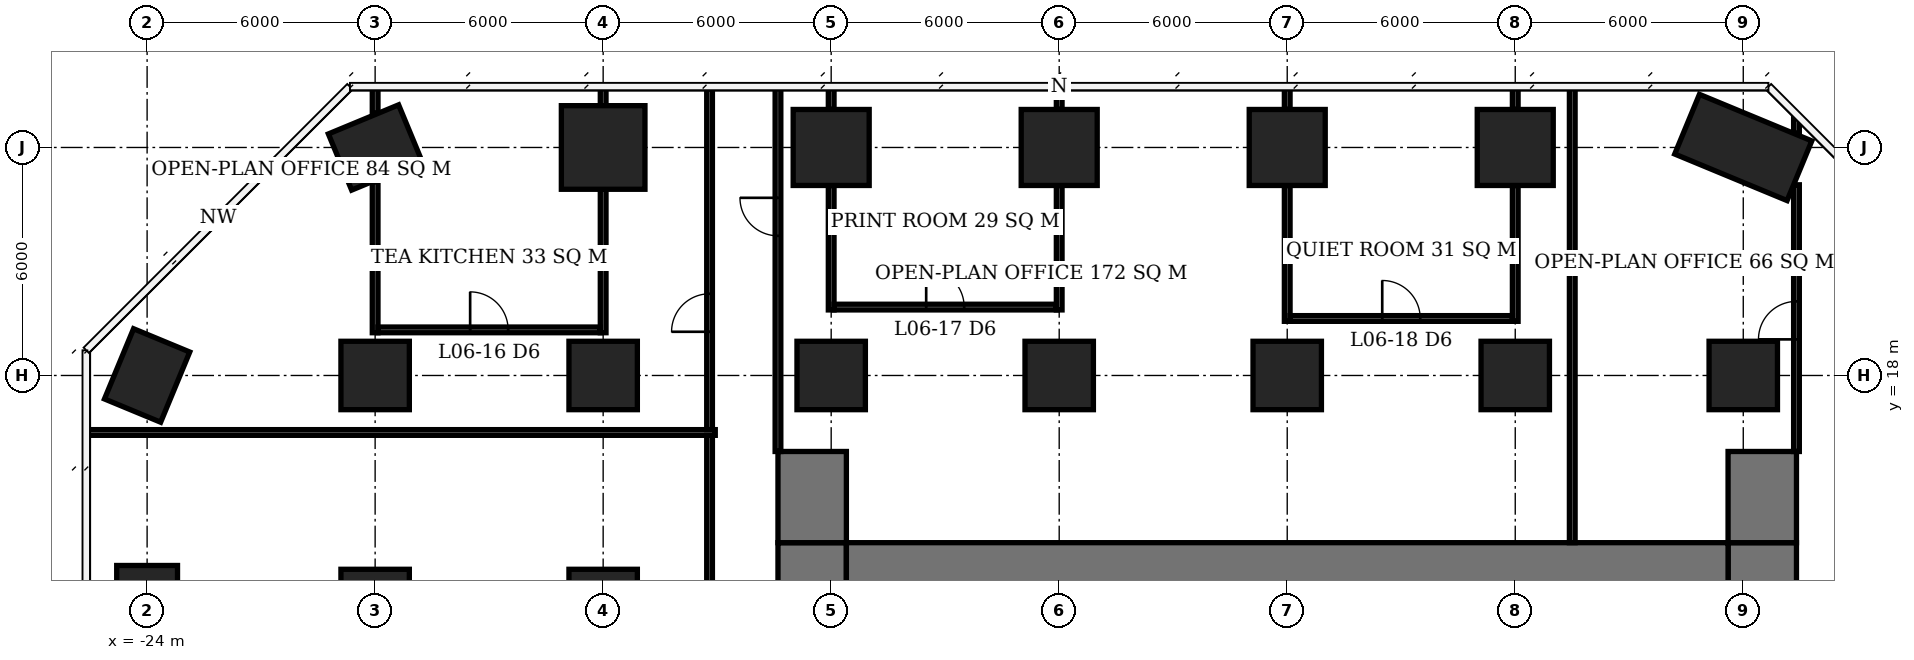
"""IFC4 building model, lengths in metres.
Left out: names, types, materials, properties, quantities, classifications, styles, units other than length and angle.
Written with IfcOpenShell. Run it as: python <this file> out.ifc"""

import sys

from ifc_helpers import new_model, si_unit, direction, frame, frame_2d, origin, origin_2d, place, context, subcontext, project, spatial, rectangle, extrude, element, fill, save


model = new_model("IFC4")
c1 = context("Model", 3, precision=1e-05, world=origin(), true_north=direction((0.0, 1.0)))
c2 = subcontext(c1, "Body", "Model", "MODEL_VIEW")
j1 = project(units=[si_unit("LENGTHUNIT", "METRE"), si_unit("PLANEANGLEUNIT", "RADIAN")], contexts=[c1])
p1 = place(None, origin())
s1 = spatial("IfcSite", under=j1, at=p1, CompositionType="ELEMENT")
p2 = place(p1, origin())
s2 = spatial("IfcBuilding", under=s1, at=p2, CompositionType="ELEMENT")
p3 = place(p2, frame((0.0, 0.0, 29.9)))
s3 = spatial("IfcBuildingStorey", under=s2, at=p3, CompositionType="ELEMENT", Elevation=29.9)
for number, where, z_axis, x_axis in (
    (1, (-24.0, 12.0, 0.0), (0.0, 0.0, 1.0), (0.0, 1.0, 0.0)),
    (2, (-24.0, 18.0, 0.0), (0.0, 0.0, 1.0), (0.383, 0.924, 0.0)),
):
    element("IfcColumn", number, at=place(p3, frame(where, z_axis=z_axis, x_axis=x_axis)), inside=s3, PredefinedType="COLUMN", context=c2, shape_type="SweptSolid", body=[
        extrude(rectangle(XDim=2.0, YDim=1.6, at=origin_2d()), origin(), (0.0, 0.0, 1.0), 3.9),
    ])
for number, where, z_axis, x_axis in (
    (3, (-18.0, 12.0, 0.0), (0.0, 0.0, 1.0), (1.0, 0.0, 0.0)),
    (4, (-18.0, 18.0, 0.0), (0.0, 0.0, 1.0), (1.0, 0.0, 0.0)),
):
    element("IfcColumn", number, at=place(p3, frame(where, z_axis=z_axis, x_axis=x_axis)), inside=s3, PredefinedType="COLUMN", context=c2, shape_type="SweptSolid", body=[
        extrude(rectangle(XDim=1.8, YDim=1.8, at=origin_2d()), origin(), (0.0, 0.0, 1.0), 3.9),
    ])
p4 = place(p3, frame((-18.0, 24.0, 0.0), z_axis=(0.0, 0.0, 1.0), x_axis=(0.923879532511, 0.382683432365, 0.0)))
e5 = element("IfcColumn", 5, at=p4, inside=s3, PredefinedType="COLUMN", context=c2, shape_type="SweptSolid", body=[
    extrude(rectangle(XDim=2.0, YDim=1.6, at=origin_2d()), origin(), (0.0, 0.0, 1.0), 3.9),
])
for number, where, z_axis, x_axis in (
    (6, (-12.0, 12.0, 0.0), (0.0, 0.0, 1.0), (1.0, 0.0, 0.0)),
    (7, (-12.0, 18.0, 0.0), (0.0, 0.0, 1.0), (1.0, 0.0, 0.0)),
):
    element("IfcColumn", number, at=place(p3, frame(where, z_axis=z_axis, x_axis=x_axis)), inside=s3, PredefinedType="COLUMN", context=c2, shape_type="SweptSolid", body=[
        extrude(rectangle(XDim=1.8, YDim=1.8, at=origin_2d()), origin(), (0.0, 0.0, 1.0), 3.9),
    ])
p5 = place(p3, frame((-12.0, 24.0, 0.0), z_axis=(0.0, 0.0, 1.0), x_axis=(1.0, 0.0, 0.0)))
e8 = element("IfcColumn", 8, at=p5, inside=s3, PredefinedType="COLUMN", context=c2, shape_type="SweptSolid", body=[
    extrude(rectangle(XDim=2.2, YDim=2.2, at=origin_2d()), origin(), (0.0, 0.0, 1.0), 3.9),
])
p6 = place(p3, frame((-6.0, 18.0, 0.0), z_axis=(0.0, 0.0, 1.0), x_axis=(1.0, 0.0, 0.0)))
e9 = element("IfcColumn", 9, at=p6, inside=s3, PredefinedType="COLUMN", context=c2, shape_type="SweptSolid", body=[
    extrude(rectangle(XDim=1.8, YDim=1.8, at=origin_2d()), origin(), (0.0, 0.0, 1.0), 3.9),
])
p7 = place(p3, frame((-6.0, 24.0, 0.0), z_axis=(0.0, 0.0, 1.0), x_axis=(1.0, 0.0, 0.0)))
e10 = element("IfcColumn", 10, at=p7, inside=s3, PredefinedType="COLUMN", context=c2, shape_type="SweptSolid", body=[
    extrude(rectangle(XDim=2.0, YDim=2.0, at=origin_2d()), origin(), (0.0, 0.0, 1.0), 3.9),
])
p8 = place(p3, frame((0.0, 18.0, 0.0), z_axis=(0.0, 0.0, 1.0), x_axis=(1.0, 0.0, 0.0)))
e11 = element("IfcColumn", 11, at=p8, inside=s3, PredefinedType="COLUMN", context=c2, shape_type="SweptSolid", body=[
    extrude(rectangle(XDim=1.8, YDim=1.8, at=origin_2d()), origin(), (0.0, 0.0, 1.0), 3.9),
])
p9 = place(p3, frame((0.0, 24.0, 0.0), z_axis=(0.0, 0.0, 1.0), x_axis=(1.0, 0.0, 0.0)))
e12 = element("IfcColumn", 12, at=p9, inside=s3, PredefinedType="COLUMN", context=c2, shape_type="SweptSolid", body=[
    extrude(rectangle(XDim=2.0, YDim=2.0, at=origin_2d()), origin(), (0.0, 0.0, 1.0), 3.9),
])
p10 = place(p3, frame((6.0, 18.0, 0.0), z_axis=(0.0, 0.0, 1.0), x_axis=(1.0, 0.0, 0.0)))
e13 = element("IfcColumn", 13, at=p10, inside=s3, PredefinedType="COLUMN", context=c2, shape_type="SweptSolid", body=[
    extrude(rectangle(XDim=1.8, YDim=1.8, at=origin_2d()), origin(), (0.0, 0.0, 1.0), 3.9),
])
p11 = place(p3, frame((6.0, 24.0, 0.0), z_axis=(0.0, 0.0, 1.0), x_axis=(1.0, 0.0, 0.0)))
e14 = element("IfcColumn", 14, at=p11, inside=s3, PredefinedType="COLUMN", context=c2, shape_type="SweptSolid", body=[
    extrude(rectangle(XDim=2.0, YDim=2.0, at=origin_2d()), origin(), (0.0, 0.0, 1.0), 3.9),
])
p12 = place(p3, frame((12.0, 18.0, 0.0), z_axis=(0.0, 0.0, 1.0), x_axis=(1.0, 0.0, 0.0)))
e15 = element("IfcColumn", 15, at=p12, inside=s3, PredefinedType="COLUMN", context=c2, shape_type="SweptSolid", body=[
    extrude(rectangle(XDim=1.8, YDim=1.8, at=origin_2d()), origin(), (0.0, 0.0, 1.0), 3.9),
])
p13 = place(p3, frame((12.0, 24.0, 0.0), z_axis=(0.0, 0.0, 1.0), x_axis=(1.0, 0.0, 0.0)))
e16 = element("IfcColumn", 16, at=p13, inside=s3, PredefinedType="COLUMN", context=c2, shape_type="SweptSolid", body=[
    extrude(rectangle(XDim=2.0, YDim=2.0, at=origin_2d()), origin(), (0.0, 0.0, 1.0), 3.9),
])
p14 = place(p3, frame((18.0, 18.0, 0.0), z_axis=(0.0, 0.0, 1.0), x_axis=(1.0, 0.0, 0.0)))
e17 = element("IfcColumn", 17, at=p14, inside=s3, PredefinedType="COLUMN", context=c2, shape_type="SweptSolid", body=[
    extrude(rectangle(XDim=1.8, YDim=1.8, at=origin_2d()), origin(), (0.0, 0.0, 1.0), 3.9),
])
p15 = place(p3, frame((18.0, 24.0, 0.0), z_axis=(0.0, 0.0, 1.0), x_axis=(0.923879532511, -0.382683432365, 0.0)))
e18 = element("IfcColumn", 18, at=p15, inside=s3, PredefinedType="COLUMN", context=c2, shape_type="SweptSolid", body=[
    extrude(rectangle(XDim=3.2, YDim=1.7, at=origin_2d()), origin(), (0.0, 0.0, 1.0), 3.9),
])
p16 = place(p3, frame((-5.6, 12.6, 0.0), z_axis=(0.0, 0.0, 1.0), x_axis=(1.0, 0.0, 0.0)))
e19 = element("IfcWall", 19, at=p16, inside=s3, PredefinedType="SHEAR", context=c2, shape_type="SweptSolid", body=[
    extrude(rectangle(XDim=23.2, YDim=2.0, at=frame_2d((11.6, 0.0))), origin(), (0.0, 0.0, 1.0), 3.9),
])
p17 = place(p3, frame((-6.5, -7.6, 0.0), z_axis=(0.0, 0.0, 1.0), x_axis=(0.0, 1.0, 0.0)))
e20 = element("IfcWall", 20, at=p17, inside=s3, PredefinedType="SHEAR", context=c2, shape_type="SweptSolid", body=[
    extrude(rectangle(XDim=21.2, YDim=1.8, at=frame_2d((10.6, 0.0))), origin(), (0.0, 0.0, 1.0), 3.9),
])
p18 = place(p17, frame((7.8, 0.0, 0.0)))
e21 = element("IfcOpeningElement", 21, at=p18, cuts=e20, PredefinedType="OPENING", context=c2, shape_type="SweptSolid", body=[
    extrude(rectangle(XDim=1.8, YDim=2.4, at=frame_2d((0.9, 1.2))), frame((0.0, 0.91, 0.0), z_axis=(0.0, -1.0, 0.0), x_axis=(1.0, 0.0, 0.0)), (0.0, 0.0, 1.0), 1.82),
])
p19 = place(p3, frame((18.5, -7.6, 0.0), z_axis=(0.0, 0.0, 1.0), x_axis=(0.0, 1.0, 0.0)))
e22 = element("IfcWall", 22, at=p19, inside=s3, PredefinedType="SHEAR", context=c2, shape_type="SweptSolid", body=[
    extrude(rectangle(XDim=21.2, YDim=1.8, at=frame_2d((10.6, 0.0))), origin(), (0.0, 0.0, 1.0), 3.9),
])
p20 = place(p19, frame((9.2, 0.0, 0.0)))
e23 = element("IfcOpeningElement", 23, at=p20, cuts=e22, PredefinedType="OPENING", context=c2, shape_type="SweptSolid", body=[
    extrude(rectangle(XDim=1.8, YDim=2.4, at=frame_2d((0.9, 1.2))), frame((0.0, 0.91, 0.0), z_axis=(0.0, -1.0, 0.0), x_axis=(1.0, 0.0, 0.0)), (0.0, 0.0, 1.0), 1.82),
])
for number, where, z_axis, x_axis in (
    (24, (-6.5, 13.6, 0.0), (0.0, 0.0, 1.0), (0.0, 1.0, 0.0)),
    (25, (18.5, 13.6, 0.0), (0.0, 0.0, 1.0), (0.0, 1.0, 0.0)),
):
    element("IfcWall", number, at=place(p3, frame(where, z_axis=z_axis, x_axis=x_axis)), inside=s3, PredefinedType="SHEAR", context=c2, shape_type="SweptSolid", body=[
        extrude(rectangle(XDim=2.4, YDim=1.8, at=frame_2d((1.2, 0.0))), origin(), (0.0, 0.0, 1.0), 3.9),
    ])
p21 = place(p3, frame((-17.925, 19.2, 0.0), z_axis=(0.0, 0.0, 1.0), x_axis=(1.0, 0.0, 0.0)))
e26 = element("IfcWall", 26, at=p21, inside=s3, PredefinedType="PARTITIONING", context=c2, shape_type="SweptSolid", body=[
    extrude(rectangle(XDim=5.85, YDim=0.15, at=frame_2d((2.925, 0.0))), origin(), (0.0, 0.0, 1.0), 3.65),
])
p22 = place(p21, frame((2.425, 0.0, 0.0)))
e27 = element("IfcOpeningElement", 27, at=p22, cuts=e26, PredefinedType="OPENING", context=c2, shape_type="SweptSolid", body=[
    extrude(rectangle(XDim=1.0, YDim=2.1, at=frame_2d((0.5, 1.05))), frame((0.0, 0.085, 0.0), z_axis=(0.0, -1.0, 0.0), x_axis=(1.0, 0.0, 0.0)), (0.0, 0.0, 1.0), 0.17),
])
p23 = place(p3, frame((6.075, 19.5, 0.0), z_axis=(0.0, 0.0, 1.0), x_axis=(1.0, 0.0, 0.0)))
e28 = element("IfcWall", 28, at=p23, inside=s3, PredefinedType="PARTITIONING", context=c2, shape_type="SweptSolid", body=[
    extrude(rectangle(XDim=5.85, YDim=0.15, at=frame_2d((2.925, 0.0))), origin(), (0.0, 0.0, 1.0), 3.65),
])
p24 = place(p23, frame((2.425, 0.0, 0.0)))
e29 = element("IfcOpeningElement", 29, at=p24, cuts=e28, PredefinedType="OPENING", context=c2, shape_type="SweptSolid", body=[
    extrude(rectangle(XDim=1.0, YDim=2.1, at=frame_2d((0.5, 1.05))), frame((0.0, 0.085, 0.0), z_axis=(0.0, -1.0, 0.0), x_axis=(1.0, 0.0, 0.0)), (0.0, 0.0, 1.0), 0.17),
])
p25 = place(p3, frame((-5.925, 19.8, 0.0), z_axis=(0.0, 0.0, 1.0), x_axis=(1.0, 0.0, 0.0)))
e30 = element("IfcWall", 30, at=p25, inside=s3, PredefinedType="PARTITIONING", context=c2, shape_type="SweptSolid", body=[
    extrude(rectangle(XDim=5.85, YDim=0.15, at=frame_2d((2.925, 0.0))), origin(), (0.0, 0.0, 1.0), 3.65),
])
p26 = place(p25, frame((2.425, 0.0, 0.0)))
e31 = element("IfcOpeningElement", 31, at=p26, cuts=e30, PredefinedType="OPENING", context=c2, shape_type="SweptSolid", body=[
    extrude(rectangle(XDim=1.0, YDim=2.1, at=frame_2d((0.5, 1.05))), frame((0.0, 0.085, 0.0), z_axis=(0.0, -1.0, 0.0), x_axis=(1.0, 0.0, 0.0)), (0.0, 0.0, 1.0), 0.17),
])
p27 = place(p3, frame((-18.0, 19.125, 0.0), z_axis=(0.0, 0.0, 1.0), x_axis=(0.0, 1.0, 0.0)))
e32 = element("IfcWall", 32, at=p27, inside=s3, PredefinedType="PARTITIONING", context=c2, shape_type="SweptSolid", body=[
    extrude(rectangle(XDim=3.978, YDim=0.15, at=frame_2d((1.989, 0.0))), origin(), (0.0, 0.0, 1.0), 3.65),
])
p28 = place(p3, frame((-18.0, 24.897, 0.0), z_axis=(0.0, 0.0, 1.0), x_axis=(0.0, 1.0, 0.0)))
e33 = element("IfcWall", 33, at=p28, inside=s3, PredefinedType="PARTITIONING", context=c2, shape_type="SweptSolid", body=[
    extrude(rectangle(XDim=0.703, YDim=0.15, at=frame_2d((0.352, 0.0))), origin(), (0.0, 0.0, 1.0), 3.65),
])
p29 = place(p3, frame((-12.0, 19.125, 0.0), z_axis=(0.0, 0.0, 1.0), x_axis=(0.0, 1.0, 0.0)))
e34 = element("IfcWall", 34, at=p29, inside=s3, PredefinedType="PARTITIONING", context=c2, shape_type="SweptSolid", body=[
    extrude(rectangle(XDim=3.775, YDim=0.15, at=frame_2d((1.887, 0.0))), origin(), (0.0, 0.0, 1.0), 3.65),
])
p30 = place(p3, frame((-12.0, 25.1, 0.0), z_axis=(0.0, 0.0, 1.0), x_axis=(0.0, 1.0, 0.0)))
e35 = element("IfcWall", 35, at=p30, inside=s3, PredefinedType="PARTITIONING", context=c2, shape_type="SweptSolid", body=[
    extrude(rectangle(XDim=0.5, YDim=0.15, at=frame_2d((0.25, 0.0))), origin(), (0.0, 0.0, 1.0), 3.65),
])
p31 = place(p3, frame((-6.0, 19.725, 0.0), z_axis=(0.0, 0.0, 1.0), x_axis=(0.0, 1.0, 0.0)))
e36 = element("IfcWall", 36, at=p31, inside=s3, PredefinedType="PARTITIONING", context=c2, shape_type="SweptSolid", body=[
    extrude(rectangle(XDim=3.275, YDim=0.15, at=frame_2d((1.637, 0.0))), origin(), (0.0, 0.0, 1.0), 3.65),
])
p32 = place(p3, frame((-6.0, 25.0, 0.0), z_axis=(0.0, 0.0, 1.0), x_axis=(0.0, 1.0, 0.0)))
e37 = element("IfcWall", 37, at=p32, inside=s3, PredefinedType="PARTITIONING", context=c2, shape_type="SweptSolid", body=[
    extrude(rectangle(XDim=0.6, YDim=0.15, at=frame_2d((0.3, 0.0))), origin(), (0.0, 0.0, 1.0), 3.65),
])
p33 = place(p3, frame((0.0, 19.725, 0.0), z_axis=(0.0, 0.0, 1.0), x_axis=(0.0, 1.0, 0.0)))
e38 = element("IfcWall", 38, at=p33, inside=s3, PredefinedType="PARTITIONING", context=c2, shape_type="SweptSolid", body=[
    extrude(rectangle(XDim=3.275, YDim=0.15, at=frame_2d((1.637, 0.0))), origin(), (0.0, 0.0, 1.0), 3.65),
])
p34 = place(p3, frame((0.0, 25.0, 0.0), z_axis=(0.0, 0.0, 1.0), x_axis=(0.0, 1.0, 0.0)))
e39 = element("IfcWall", 39, at=p34, inside=s3, PredefinedType="PARTITIONING", context=c2, shape_type="SweptSolid", body=[
    extrude(rectangle(XDim=0.55, YDim=0.15, at=frame_2d((0.275, 0.0))), origin(), (0.0, 0.0, 1.0), 3.65),
])
p35 = place(p3, frame((6.0, 19.425, 0.0), z_axis=(0.0, 0.0, 1.0), x_axis=(0.0, 1.0, 0.0)))
e40 = element("IfcWall", 40, at=p35, inside=s3, PredefinedType="PARTITIONING", context=c2, shape_type="SweptSolid", body=[
    extrude(rectangle(XDim=3.575, YDim=0.15, at=frame_2d((1.788, 0.0))), origin(), (0.0, 0.0, 1.0), 3.65),
])
p36 = place(p3, frame((6.0, 25.0, 0.0), z_axis=(0.0, 0.0, 1.0), x_axis=(0.0, 1.0, 0.0)))
e41 = element("IfcWall", 41, at=p36, inside=s3, PredefinedType="PARTITIONING", context=c2, shape_type="SweptSolid", body=[
    extrude(rectangle(XDim=0.6, YDim=0.15, at=frame_2d((0.3, 0.0))), origin(), (0.0, 0.0, 1.0), 3.65),
])
p37 = place(p3, frame((12.0, 19.425, 0.0), z_axis=(0.0, 0.0, 1.0), x_axis=(0.0, 1.0, 0.0)))
e42 = element("IfcWall", 42, at=p37, inside=s3, PredefinedType="PARTITIONING", context=c2, shape_type="SweptSolid", body=[
    extrude(rectangle(XDim=3.575, YDim=0.15, at=frame_2d((1.788, 0.0))), origin(), (0.0, 0.0, 1.0), 3.65),
])
p38 = place(p3, frame((12.0, 25.0, 0.0), z_axis=(0.0, 0.0, 1.0), x_axis=(0.0, 1.0, 0.0)))
e43 = element("IfcWall", 43, at=p38, inside=s3, PredefinedType="PARTITIONING", context=c2, shape_type="SweptSolid", body=[
    extrude(rectangle(XDim=0.6, YDim=0.15, at=frame_2d((0.3, 0.0))), origin(), (0.0, 0.0, 1.0), 3.65),
])
p39 = place(p3, frame((-25.6, 16.5, 0.0), z_axis=(0.0, 0.0, 1.0), x_axis=(1.0, 0.0, 0.0)))
e44 = element("IfcWall", 44, at=p39, inside=s3, PredefinedType="PARTITIONING", context=c2, shape_type="SweptSolid", body=[
    extrude(rectangle(XDim=16.55, YDim=0.15, at=frame_2d((8.275, 0.0))), origin(), (0.0, 0.0, 1.0), 3.65),
])
p40 = place(p3, frame((-9.2, -1.425, 0.0), z_axis=(0.0, 0.0, 1.0), x_axis=(0.0, 1.0, 0.0)))
e45 = element("IfcWall", 45, at=p40, inside=s3, PredefinedType="PARTITIONING", context=c2, shape_type="SweptSolid", body=[
    extrude(rectangle(XDim=17.85, YDim=0.15, at=frame_2d((8.925, 0.0))), origin(), (0.0, 0.0, 1.0), 3.65),
])
p41 = place(p40, frame((5.725, 0.0, 0.0)))
e46 = element("IfcOpeningElement", 46, at=p41, cuts=e45, PredefinedType="OPENING", context=c2, shape_type="SweptSolid", body=[
    extrude(rectangle(XDim=1.0, YDim=2.1, at=frame_2d((0.5, 1.05))), frame((0.0, 0.085, 0.0), z_axis=(0.0, -1.0, 0.0), x_axis=(1.0, 0.0, 0.0)), (0.0, 0.0, 1.0), 0.17),
])
p42 = place(p3, frame((-9.2, 16.575, 0.0), z_axis=(0.0, 0.0, 1.0), x_axis=(0.0, 1.0, 0.0)))
e47 = element("IfcWall", 47, at=p42, inside=s3, PredefinedType="PARTITIONING", context=c2, shape_type="SweptSolid", body=[
    extrude(rectangle(XDim=8.975, YDim=0.15, at=frame_2d((4.488, 0.0))), origin(), (0.0, 0.0, 1.0), 3.65),
])
p43 = place(p42, frame((2.575, 0.0, 0.0)))
e48 = element("IfcOpeningElement", 48, at=p43, cuts=e47, PredefinedType="OPENING", context=c2, shape_type="SweptSolid", body=[
    extrude(rectangle(XDim=1.0, YDim=2.1, at=frame_2d((0.5, 1.05))), frame((0.0, 0.085, 0.0), z_axis=(0.0, -1.0, 0.0), x_axis=(1.0, 0.0, 0.0)), (0.0, 0.0, 1.0), 0.17),
])
p44 = place(p3, frame((-7.4, 16.0, 0.0), z_axis=(0.0, 0.0, 1.0), x_axis=(0.0, 1.0, 0.0)))
e49 = element("IfcWall", 49, at=p44, inside=s3, PredefinedType="PARTITIONING", context=c2, shape_type="SweptSolid", body=[
    extrude(rectangle(XDim=9.6, YDim=0.15, at=frame_2d((4.8, 0.0))), origin(), (0.0, 0.0, 1.0), 3.65),
])
p45 = place(p44, frame((5.675, 0.0, 0.0)))
e50 = element("IfcOpeningElement", 50, at=p45, cuts=e49, PredefinedType="OPENING", context=c2, shape_type="SweptSolid", body=[
    extrude(rectangle(XDim=1.0, YDim=2.1, at=frame_2d((0.5, 1.05))), frame((0.0, 0.085, 0.0), z_axis=(0.0, -1.0, 0.0), x_axis=(1.0, 0.0, 0.0)), (0.0, 0.0, 1.0), 0.17),
])
p46 = place(p3, frame((13.5, 13.6, 0.0), z_axis=(0.0, 0.0, 1.0), x_axis=(0.0, 1.0, 0.0)))
e51 = element("IfcWall", 51, at=p46, inside=s3, PredefinedType="PARTITIONING", context=c2, shape_type="SweptSolid", body=[
    extrude(rectangle(XDim=12.0, YDim=0.15, at=frame_2d((6.0, 0.0))), origin(), (0.0, 0.0, 1.0), 3.65),
])
p47 = place(p3, frame((19.4, 16.0, 0.0), z_axis=(0.0, 0.0, 1.0), x_axis=(0.0, 1.0, 0.0)))
e52 = element("IfcWall", 52, at=p47, inside=s3, PredefinedType="PARTITIONING", context=c2, shape_type="SweptSolid", body=[
    extrude(rectangle(XDim=7.018, YDim=0.15, at=frame_2d((3.509, 0.0))), origin(), (0.0, 0.0, 1.0), 3.65),
])
p48 = place(p47, frame((2.95, 0.0, 0.0)))
e53 = element("IfcOpeningElement", 53, at=p48, cuts=e52, PredefinedType="OPENING", context=c2, shape_type="SweptSolid", body=[
    extrude(rectangle(XDim=1.0, YDim=2.1, at=frame_2d((0.5, 1.05))), frame((0.0, 0.085, 0.0), z_axis=(0.0, -1.0, 0.0), x_axis=(1.0, 0.0, 0.0)), (0.0, 0.0, 1.0), 0.17),
])
p49 = place(p3, frame((19.4, 24.371, 0.0), z_axis=(0.0, 0.0, 1.0), x_axis=(0.0, 1.0, 0.0)))
e54 = element("IfcWall", 54, at=p49, inside=s3, PredefinedType="PARTITIONING", context=c2, shape_type="SweptSolid", body=[
    extrude(rectangle(XDim=0.4, YDim=0.15, at=frame_2d((0.2, 0.0))), origin(), (0.0, 0.0, 1.0), 3.65),
])
p50 = place(p22, origin())
e55 = element("IfcDoor", 55, at=p50, inside=s3, OperationType="SINGLE_SWING_LEFT", PredefinedType="DOOR", context=c2, shape_type="SweptSolid", body=[
    extrude(rectangle(XDim=1.0, YDim=2.1, at=frame_2d((0.5, 1.05))), frame((0.0, 0.025, 0.0), z_axis=(0.0, -1.0, 0.0), x_axis=(1.0, 0.0, 0.0)), (0.0, 0.0, 1.0), 0.05),
])
fill(e27, e55)
p51 = place(p26, origin())
e56 = element("IfcDoor", 56, at=p51, inside=s3, OperationType="SINGLE_SWING_LEFT", PredefinedType="DOOR", context=c2, shape_type="SweptSolid", body=[
    extrude(rectangle(XDim=1.0, YDim=2.1, at=frame_2d((0.5, 1.05))), frame((0.0, 0.025, 0.0), z_axis=(0.0, -1.0, 0.0), x_axis=(1.0, 0.0, 0.0)), (0.0, 0.0, 1.0), 0.05),
])
fill(e31, e56)
p52 = place(p24, origin())
e57 = element("IfcDoor", 57, at=p52, inside=s3, OperationType="SINGLE_SWING_LEFT", PredefinedType="DOOR", context=c2, shape_type="SweptSolid", body=[
    extrude(rectangle(XDim=1.0, YDim=2.1, at=frame_2d((0.5, 1.05))), frame((0.0, 0.025, 0.0), z_axis=(0.0, -1.0, 0.0), x_axis=(1.0, 0.0, 0.0)), (0.0, 0.0, 1.0), 0.05),
])
fill(e29, e57)
p53 = place(p45, origin())
e58 = element("IfcDoor", 58, at=p53, inside=s3, OperationType="SINGLE_SWING_RIGHT", PredefinedType="DOOR", context=c2, shape_type="SweptSolid", body=[
    extrude(rectangle(XDim=1.0, YDim=2.1, at=frame_2d((0.5, 1.05))), frame((0.0, 0.025, 0.0), z_axis=(0.0, -1.0, 0.0), x_axis=(1.0, 0.0, 0.0)), (0.0, 0.0, 1.0), 0.05),
])
fill(e50, e58)
p54 = place(p43, origin())
e59 = element("IfcDoor", 59, at=p54, inside=s3, OperationType="SINGLE_SWING_LEFT", PredefinedType="DOOR", context=c2, shape_type="SweptSolid", body=[
    extrude(rectangle(XDim=1.0, YDim=2.1, at=frame_2d((0.5, 1.05))), frame((0.0, 0.025, 0.0), z_axis=(0.0, -1.0, 0.0), x_axis=(1.0, 0.0, 0.0)), (0.0, 0.0, 1.0), 0.05),
])
fill(e48, e59)
p55 = place(p48, origin())
e60 = element("IfcDoor", 60, at=p55, inside=s3, OperationType="SINGLE_SWING_LEFT", PredefinedType="DOOR", context=c2, shape_type="SweptSolid", body=[
    extrude(rectangle(XDim=1.0, YDim=2.1, at=frame_2d((0.5, 1.05))), frame((0.0, 0.025, 0.0), z_axis=(0.0, -1.0, 0.0), x_axis=(1.0, 0.0, 0.0)), (0.0, 0.0, 1.0), 0.05),
])
fill(e53, e60)
save(model, sys.argv[1])
